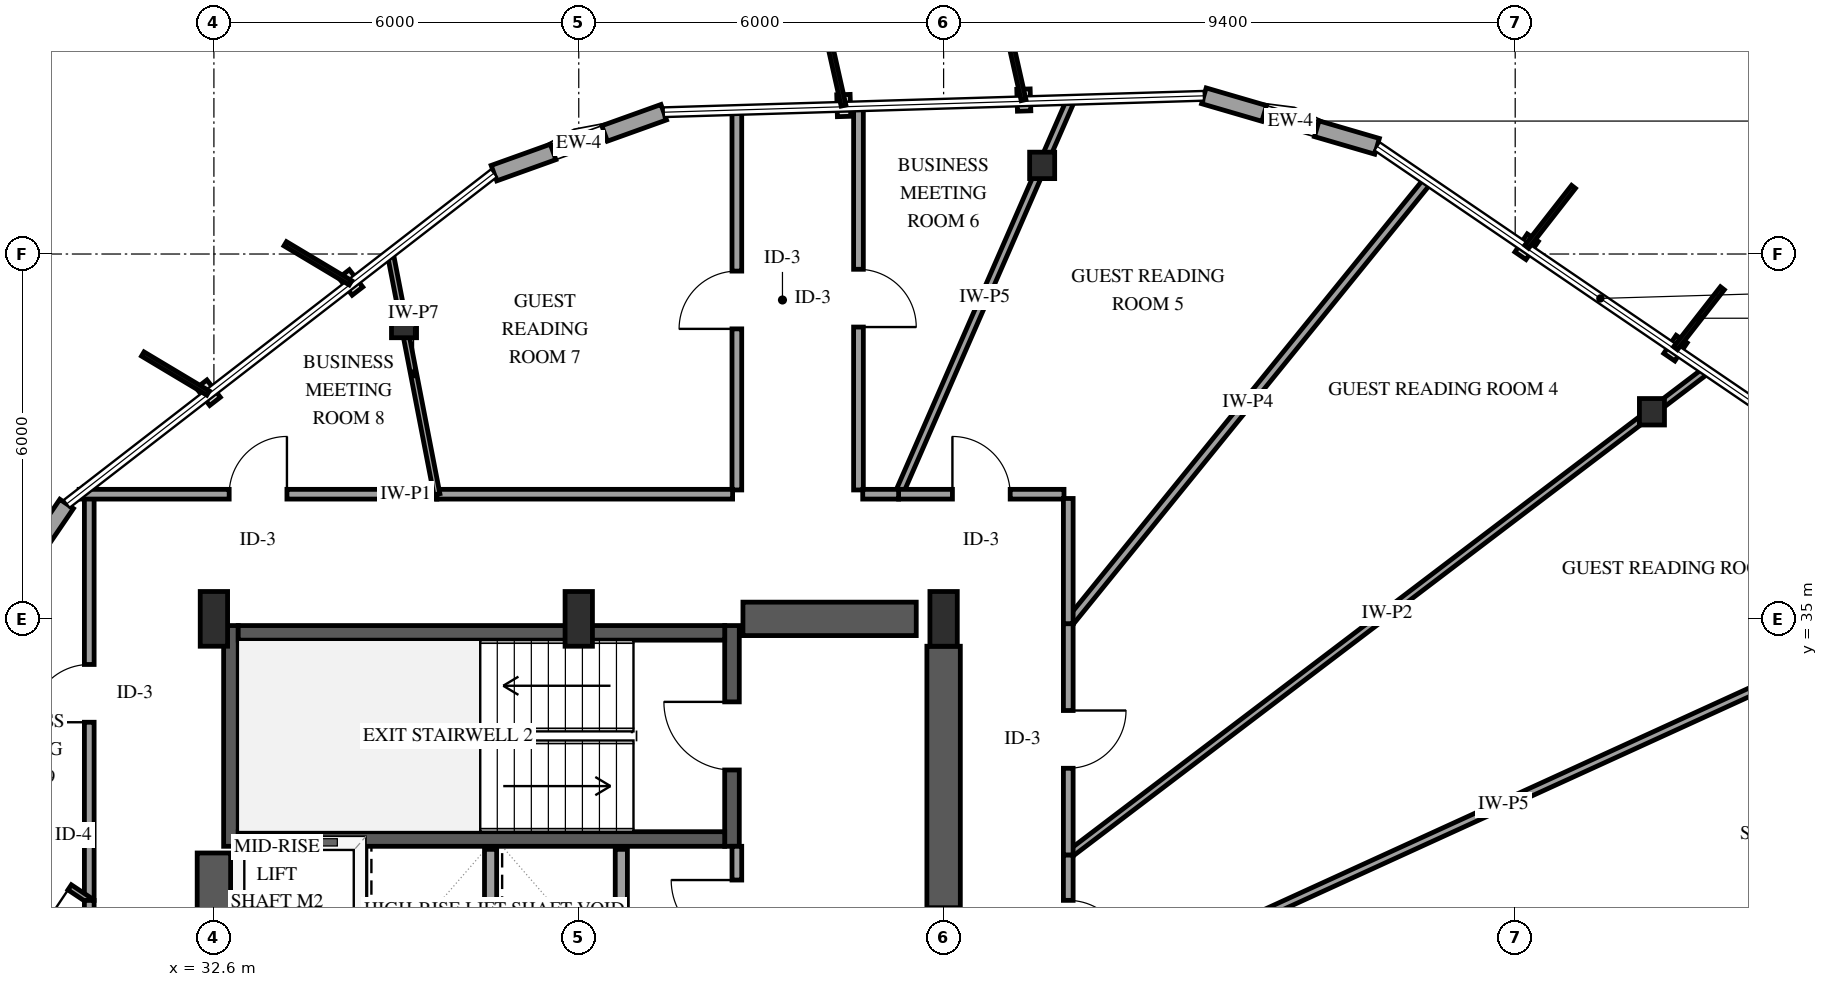
"""IFC4 building model, lengths in metres.
Left out: names, types, materials, properties, quantities, classifications, styles, units other than length and angle.
Written with IfcOpenShell. Run it as: python <this file> out.ifc"""

import sys

from ifc_helpers import new_model, si_unit, direction, frame, frame_2d, origin, origin_2d, place, context, subcontext, project, spatial, rectangle, i_section, extrude, element, fill, save


model = new_model("IFC4")
c1 = context("Model", 3, precision=1e-05, world=origin(), true_north=direction((0.0, 1.0)))
c2 = subcontext(c1, "Body", "Model", "MODEL_VIEW")
j1 = project(units=[si_unit("LENGTHUNIT", "METRE"), si_unit("PLANEANGLEUNIT", "RADIAN")], contexts=[c1])
p1 = place(None, origin())
s1 = spatial("IfcSite", under=j1, at=p1, CompositionType="ELEMENT")
p2 = place(p1, origin())
s2 = spatial("IfcBuilding", under=s1, at=p2, CompositionType="ELEMENT")
p3 = place(p2, frame((0.0, 0.0, 171.4)))
s3 = spatial("IfcBuildingStorey", under=s2, at=p3, CompositionType="ELEMENT", Elevation=171.4)
p4 = place(p3, frame((32.88, 31.26, 0.0), z_axis=(0.0, 0.0, 1.0), x_axis=(0.0, 1.0, 0.0)))
e1 = element("IfcWall", 1, at=p4, inside=s3, PredefinedType="SHEAR", context=c2, shape_type="SweptSolid", body=[
    extrude(rectangle(XDim=3.63, YDim=0.24, at=frame_2d((1.815, 0.0))), origin(), (0.0, 0.0, 1.0), 3.6),
])
p5 = place(p3, frame((41.12, 31.26, 0.0), z_axis=(0.0, 0.0, 1.0), x_axis=(0.0, 1.0, 0.0)))
e2 = element("IfcWall", 2, at=p5, inside=s3, PredefinedType="SHEAR", context=c2, shape_type="SweptSolid", body=[
    extrude(rectangle(XDim=3.63, YDim=0.24, at=frame_2d((1.815, 0.0))), origin(), (0.0, 0.0, 1.0), 3.6),
])
p6 = place(p5, frame((1.255, 0.0, 0.0)))
e3 = element("IfcOpeningElement", 3, at=p6, cuts=e2, PredefinedType="OPENING", context=c2, shape_type="SweptSolid", body=[
    extrude(rectangle(XDim=1.12, YDim=2.15, at=frame_2d((0.56, 1.075))), frame((0.0, 0.13, 0.0), z_axis=(0.0, -1.0, 0.0), x_axis=(1.0, 0.0, 0.0)), (0.0, 0.0, 1.0), 0.26),
])
for number, where, z_axis, x_axis in (
    (4, (33.0, 31.38, 0.0), (0.0, 0.0, 1.0), (1.0, 0.0, 0.0)),
    (5, (33.0, 34.77, 0.0), (0.0, 0.0, 1.0), (1.0, 0.0, 0.0)),
):
    element("IfcWall", number, at=place(p3, frame(where, z_axis=z_axis, x_axis=x_axis)), inside=s3, PredefinedType="SHEAR", context=c2, shape_type="SweptSolid", body=[
        extrude(rectangle(XDim=8.0, YDim=0.24, at=frame_2d((4.0, 0.0))), origin(), (0.0, 0.0, 1.0), 3.6),
    ])
p7 = place(p3, frame((32.6, 18.85, 0.0), z_axis=(0.0, 0.0, 1.0), x_axis=(0.0, 1.0, 0.0)))
e6 = element("IfcWall", 6, at=p7, inside=s3, PredefinedType="SHEAR", context=c2, shape_type="SweptSolid", body=[
    extrude(rectangle(XDim=12.3, YDim=0.55, at=frame_2d((6.15, 0.0))), origin(), (0.0, 0.0, 1.0), 3.6),
])
p8 = place(p3, frame((41.3, 35.0, 0.0), z_axis=(0.0, 0.0, 1.0), x_axis=(1.0, 0.0, 0.0)))
e7 = element("IfcWall", 7, at=p8, inside=s3, PredefinedType="SHEAR", context=c2, shape_type="SweptSolid", body=[
    extrude(rectangle(XDim=2.85, YDim=0.55, at=frame_2d((1.425, 0.0))), origin(), (0.0, 0.0, 1.0), 3.6),
])
p9 = place(p3, frame((44.6, 29.8, 0.0), z_axis=(0.0, 0.0, 1.0), x_axis=(0.0, 1.0, 0.0)))
e8 = element("IfcWall", 8, at=p9, inside=s3, PredefinedType="SHEAR", context=c2, shape_type="SweptSolid", body=[
    extrude(rectangle(XDim=4.75, YDim=0.55, at=frame_2d((2.375, 0.0))), origin(), (0.0, 0.0, 1.0), 3.6),
])
for number, where, z_axis, x_axis in (
    (9, (32.6, 35.0, 0.0), (0.0, 0.0, 1.0), (1.0, 0.0, 0.0)),
    (10, (38.6, 35.0, 0.0), (0.0, 0.0, 1.0), (1.0, 0.0, 0.0)),
    (11, (44.6, 35.0, 0.0), (0.0, 0.0, 1.0), (1.0, 0.0, 0.0)),
):
    element("IfcColumn", number, at=place(p3, frame(where, z_axis=z_axis, x_axis=x_axis)), inside=s3, PredefinedType="PILASTER", context=c2, shape_type="SweptSolid", body=[
        extrude(rectangle(XDim=0.45, YDim=0.9, at=origin_2d()), origin(), (0.0, 0.0, 1.0), 3.6),
    ])
for number, where, z_axis, x_axis in (
    (12, (56.249, 38.406, 0.0), (0.0, 0.0, 1.0), (1.0, 0.0, 0.0)),
    (13, (46.221, 42.458, 0.0), (0.0, 0.0, 1.0), (1.0, 0.0, 0.0)),
    (14, (35.726, 39.841, 0.0), (0.0, 0.0, 1.0), (1.0, 0.0, 0.0)),
):
    element("IfcColumn", number, at=place(p3, frame(where, z_axis=z_axis, x_axis=x_axis)), inside=s3, PredefinedType="COLUMN", context=c2, shape_type="SweptSolid", body=[
        extrude(i_section(OverallWidth=0.412, OverallDepth=0.435, WebThickness=0.036, FlangeThickness=0.057, FilletRadius=0.038, at=origin_2d()), origin(), (0.0, 0.0, 1.0), 3.6),
    ])
p10 = place(p3, frame((51.728, 42.771, 0.0), z_axis=(0.0, 0.0, 1.0), x_axis=(-0.96000645191, 0.279977878217, 0.0)))
e15 = element("IfcWall", 15, at=p10, inside=s3, PredefinedType="SOLIDWALL", context=c2, shape_type="SweptSolid", body=[
    extrude(rectangle(XDim=2.967, YDim=0.27, at=frame_2d((1.483, 0.0))), origin(), (0.0, 0.0, 1.0), 2.679),
])
p11 = place(p10, frame((1.033, 0.0, 0.75)))
e16 = element("IfcOpeningElement", 16, at=p11, cuts=e15, PredefinedType="OPENING", context=c2, shape_type="SweptSolid", body=[
    extrude(rectangle(XDim=0.9, YDim=1.5, at=frame_2d((0.45, 0.75))), frame((0.0, 0.145, 0.0), z_axis=(0.0, -1.0, 0.0), x_axis=(1.0, 0.0, 0.0)), (0.0, 0.0, 1.0), 0.29),
])
p12 = place(p3, frame((39.998, 43.332, 0.0), z_axis=(0.0, 0.0, 1.0), x_axis=(-0.94123626771, -0.337748853955, 0.0)))
e17 = element("IfcWall", 17, at=p12, inside=s3, PredefinedType="SOLIDWALL", context=c2, shape_type="SweptSolid", body=[
    extrude(rectangle(XDim=2.967, YDim=0.27, at=frame_2d((1.483, 0.0))), origin(), (0.0, 0.0, 1.0), 2.679),
])
p13 = place(p12, frame((1.033, 0.0, 0.75)))
e18 = element("IfcOpeningElement", 18, at=p13, cuts=e17, PredefinedType="OPENING", context=c2, shape_type="SweptSolid", body=[
    extrude(rectangle(XDim=0.9, YDim=1.5, at=frame_2d((0.45, 0.75))), frame((0.0, 0.145, 0.0), z_axis=(0.0, -1.0, 0.0), x_axis=(1.0, 0.0, 0.0)), (0.0, 0.0, 1.0), 0.29),
])
p14 = place(p3, frame((30.178, 36.89, 0.0), z_axis=(0.0, 0.0, 1.0), x_axis=(-0.563009904687, -0.826450148058, 0.0)))
e19 = element("IfcWall", 19, at=p14, inside=s3, PredefinedType="SOLIDWALL", context=c2, shape_type="SweptSolid", body=[
    extrude(rectangle(XDim=2.967, YDim=0.27, at=frame_2d((1.483, 0.0))), origin(), (0.0, 0.0, 1.0), 2.679),
])
p15 = place(p14, frame((1.033, 0.0, 0.75)))
e20 = element("IfcOpeningElement", 20, at=p15, cuts=e19, PredefinedType="OPENING", context=c2, shape_type="SweptSolid", body=[
    extrude(rectangle(XDim=0.9, YDim=1.5, at=frame_2d((0.45, 0.75))), frame((0.0, 0.145, 0.0), z_axis=(0.0, -1.0, 0.0), x_axis=(1.0, 0.0, 0.0)), (0.0, 0.0, 1.0), 0.29),
])
for number, where, z_axis, x_axis in (
    (21, (35.0, 29.11, 0.0), (0.0, 0.0, 1.0), (0.0, 1.0, 0.0)),
    (22, (37.15, 29.11, 0.0), (0.0, 0.0, 1.0), (0.0, 1.0, 0.0)),
    (23, (39.3, 29.11, 0.0), (0.0, 0.0, 1.0), (0.0, 1.0, 0.0)),
):
    element("IfcWall", number, at=place(p3, frame(where, z_axis=z_axis, x_axis=x_axis)), inside=s3, PredefinedType="SOLIDWALL", context=c2, shape_type="SweptSolid", body=[
        extrude(rectangle(XDim=2.1, YDim=0.2, at=frame_2d((1.05, 0.0))), origin(), (0.0, 0.0, 1.0), 3.3),
    ])
p16 = place(p3, frame((46.65, 28.677, 0.0), z_axis=(0.0, 0.0, 1.0), x_axis=(0.909594452682, 0.41549721016, 0.0)))
e24 = element("IfcWall", 24, at=p16, inside=s3, PredefinedType="PARTITIONING", context=c2, shape_type="SweptSolid", body=[
    extrude(rectangle(XDim=15.736, YDim=0.13, at=frame_2d((7.868, 0.0))), origin(), (0.0, 0.0, 1.0), 3.3),
])
p17 = place(p3, frame((46.65, 31.115, 0.0), z_axis=(0.0, 0.0, 1.0), x_axis=(0.79632035824, 0.604875100375, 0.0)))
e25 = element("IfcWall", 25, at=p17, inside=s3, PredefinedType="PARTITIONING", context=c2, shape_type="SweptSolid", body=[
    extrude(rectangle(XDim=13.175, YDim=0.12, at=frame_2d((6.587, 0.0))), origin(), (0.0, 0.0, 1.0), 3.3),
])
p18 = place(p3, frame((46.65, 34.921, 0.0), z_axis=(0.0, 0.0, 1.0), x_axis=(0.63011430349, 0.776502391842, 0.0)))
e26 = element("IfcWall", 26, at=p18, inside=s3, PredefinedType="PARTITIONING", context=c2, shape_type="SweptSolid", body=[
    extrude(rectangle(XDim=9.379, YDim=0.14, at=frame_2d((4.69, 0.0))), origin(), (0.0, 0.0, 1.0), 3.3),
])
p19 = place(p3, frame((43.86, 37.05, 0.0), z_axis=(0.0, 0.0, 1.0), x_axis=(0.400185264295, 0.916434260731, 0.0)))
e27 = element("IfcWall", 27, at=p19, inside=s3, PredefinedType="PARTITIONING", context=c2, shape_type="SweptSolid", body=[
    extrude(rectangle(XDim=7.076, YDim=0.13, at=frame_2d((3.538, 0.0))), origin(), (0.0, 0.0, 1.0), 2.595),
])
p20 = place(p3, frame((30.55, 30.37, 0.0), z_axis=(0.0, 0.0, 1.0), x_axis=(0.0, 1.0, 0.0)))
e28 = element("IfcWall", 28, at=p20, inside=s3, PredefinedType="PARTITIONING", context=c2, shape_type="SweptSolid", body=[
    extrude(rectangle(XDim=6.809, YDim=0.16, at=frame_2d((3.404, 0.0))), origin(), (0.0, 0.0, 1.0), 3.3),
])
p21 = place(p20, frame((2.93, 0.0, 0.0)))
e29 = element("IfcOpeningElement", 29, at=p21, cuts=e28, PredefinedType="OPENING", context=c2, shape_type="SweptSolid", body=[
    extrude(rectangle(XDim=0.95, YDim=2.15, at=frame_2d((0.475, 1.075))), frame((0.0, 0.09, 0.0), z_axis=(0.0, -1.0, 0.0), x_axis=(1.0, 0.0, 0.0)), (0.0, 0.0, 1.0), 0.18),
])
p22 = place(p3, frame((43.2, 43.429, 0.0), z_axis=(0.0, 0.0, 1.0), x_axis=(0.0, -1.0, 0.0)))
e30 = element("IfcWall", 30, at=p22, inside=s3, PredefinedType="PARTITIONING", context=c2, shape_type="SweptSolid", body=[
    extrude(rectangle(XDim=6.309, YDim=0.16, at=frame_2d((3.154, 0.0))), origin(), (0.0, 0.0, 1.0), 3.3),
])
p23 = place(p22, frame((2.68, 0.0, 0.0)))
e31 = element("IfcOpeningElement", 31, at=p23, cuts=e30, PredefinedType="OPENING", context=c2, shape_type="SweptSolid", body=[
    extrude(rectangle(XDim=0.95, YDim=2.15, at=frame_2d((0.475, 1.075))), frame((0.0, 0.09, 0.0), z_axis=(0.0, -1.0, 0.0), x_axis=(1.0, 0.0, 0.0)), (0.0, 0.0, 1.0), 0.18),
])
p24 = place(p3, frame((41.2, 37.12, 0.0), z_axis=(0.0, 0.0, 1.0), x_axis=(0.0, 1.0, 0.0)))
e32 = element("IfcWall", 32, at=p24, inside=s3, PredefinedType="PARTITIONING", context=c2, shape_type="SweptSolid", body=[
    extrude(rectangle(XDim=6.248, YDim=0.16, at=frame_2d((3.124, 0.0))), origin(), (0.0, 0.0, 1.0), 2.678),
])
p25 = place(p24, frame((2.649, 0.0, 0.0)))
e33 = element("IfcOpeningElement", 33, at=p25, cuts=e32, PredefinedType="OPENING", context=c2, shape_type="SweptSolid", body=[
    extrude(rectangle(XDim=0.95, YDim=2.15, at=frame_2d((0.475, 1.075))), frame((0.0, 0.09, 0.0), z_axis=(0.0, -1.0, 0.0), x_axis=(1.0, 0.0, 0.0)), (0.0, 0.0, 1.0), 0.18),
])
p26 = place(p3, frame((30.384, 37.05, 0.0), z_axis=(0.0, 0.0, 1.0), x_axis=(1.0, 0.0, 0.0)))
e34 = element("IfcWall", 34, at=p26, inside=s3, PredefinedType="PARTITIONING", context=c2, shape_type="SweptSolid", body=[
    extrude(rectangle(XDim=5.883, YDim=0.16, at=frame_2d((2.941, 0.0))), origin(), (0.0, 0.0, 1.0), 3.3),
])
p27 = place(p26, frame((2.467, 0.0, 0.0)))
e35 = element("IfcOpeningElement", 35, at=p27, cuts=e34, PredefinedType="OPENING", context=c2, shape_type="SweptSolid", body=[
    extrude(rectangle(XDim=0.95, YDim=2.15, at=frame_2d((0.475, 1.075))), frame((0.0, 0.09, 0.0), z_axis=(0.0, -1.0, 0.0), x_axis=(1.0, 0.0, 0.0)), (0.0, 0.0, 1.0), 0.18),
])
p28 = place(p3, frame((36.267, 37.05, 0.0), z_axis=(0.0, 0.0, 1.0), x_axis=(1.0, 0.0, 0.0)))
e36 = element("IfcWall", 36, at=p28, inside=s3, PredefinedType="PARTITIONING", context=c2, shape_type="SweptSolid", body=[
    extrude(rectangle(XDim=4.863, YDim=0.16, at=frame_2d((2.431, 0.0))), origin(), (0.0, 0.0, 1.0), 3.3),
])
p29 = place(p3, frame((36.267, 37.05, 0.0), z_axis=(0.0, 0.0, 1.0), x_axis=(-0.190176227139, 0.981749969509, 0.0)))
e37 = element("IfcWall", 37, at=p29, inside=s3, PredefinedType="PARTITIONING", context=c2, shape_type="SweptSolid", body=[
    extrude(rectangle(XDim=4.034, YDim=0.1, at=frame_2d((2.017, 0.0))), origin(), (0.0, 0.0, 1.0), 2.595),
])
p30 = place(p3, frame((46.65, 34.921, 0.0), z_axis=(0.0, 0.0, 1.0), x_axis=(0.0, -1.0, 0.0)))
e38 = element("IfcWall", 38, at=p30, inside=s3, PredefinedType="PARTITIONING", context=c2, shape_type="SweptSolid", body=[
    extrude(rectangle(XDim=3.806, YDim=0.16, at=frame_2d((1.903, 0.0))), origin(), (0.0, 0.0, 1.0), 3.3),
])
p31 = place(p30, frame((1.428, 0.0, 0.0)))
e39 = element("IfcOpeningElement", 39, at=p31, cuts=e38, PredefinedType="OPENING", context=c2, shape_type="SweptSolid", body=[
    extrude(rectangle(XDim=0.95, YDim=2.15, at=frame_2d((0.475, 1.075))), frame((0.0, 0.09, 0.0), z_axis=(0.0, -1.0, 0.0), x_axis=(1.0, 0.0, 0.0)), (0.0, 0.0, 1.0), 0.18),
])
p32 = place(p3, frame((30.55, 30.37, 0.0), z_axis=(0.0, 0.0, 1.0), x_axis=(-0.831784371752, 0.555098873092, 0.0)))
e40 = element("IfcWall", 40, at=p32, inside=s3, PredefinedType="PARTITIONING", context=c2, shape_type="SweptSolid", body=[
    extrude(rectangle(XDim=3.25, YDim=0.1, at=frame_2d((1.625, 0.0))), origin(), (0.0, 0.0, 1.0), 3.3),
])
p33 = place(p32, frame((0.387, 0.0, 0.0)))
e41 = element("IfcOpeningElement", 41, at=p33, cuts=e40, PredefinedType="OPENING", context=c2, shape_type="SweptSolid", body=[
    extrude(rectangle(XDim=0.85, YDim=2.1, at=frame_2d((0.425, 1.05))), frame((0.0, 0.06, 0.0), z_axis=(0.0, -1.0, 0.0), x_axis=(1.0, 0.0, 0.0)), (0.0, 0.0, 1.0), 0.12),
])
p34 = place(p3, frame((43.86, 37.05, 0.0), z_axis=(0.0, 0.0, 1.0), x_axis=(1.0, 0.0, 0.0)))
e42 = element("IfcWall", 42, at=p34, inside=s3, PredefinedType="PARTITIONING", context=c2, shape_type="SweptSolid", body=[
    extrude(rectangle(XDim=2.72, YDim=0.16, at=frame_2d((1.36, 0.0))), origin(), (0.0, 0.0, 1.0), 3.3),
])
p35 = place(p34, frame((0.885, 0.0, 0.0)))
e43 = element("IfcOpeningElement", 43, at=p35, cuts=e42, PredefinedType="OPENING", context=c2, shape_type="SweptSolid", body=[
    extrude(rectangle(XDim=0.95, YDim=2.15, at=frame_2d((0.475, 1.075))), frame((0.0, 0.09, 0.0), z_axis=(0.0, -1.0, 0.0), x_axis=(1.0, 0.0, 0.0)), (0.0, 0.0, 1.0), 0.18),
])
p36 = place(p3, frame((46.65, 31.115, 0.0), z_axis=(0.0, 0.0, 1.0), x_axis=(0.0, -1.0, 0.0)))
e44 = element("IfcWall", 44, at=p36, inside=s3, PredefinedType="PARTITIONING", context=c2, shape_type="SweptSolid", body=[
    extrude(rectangle(XDim=2.438, YDim=0.16, at=frame_2d((1.219, 0.0))), origin(), (0.0, 0.0, 1.0), 3.3),
])
p37 = place(p36, frame((0.744, 0.0, 0.0)))
e45 = element("IfcOpeningElement", 45, at=p37, cuts=e44, PredefinedType="OPENING", context=c2, shape_type="SweptSolid", body=[
    extrude(rectangle(XDim=0.95, YDim=2.15, at=frame_2d((0.475, 1.075))), frame((0.0, 0.09, 0.0), z_axis=(0.0, -1.0, 0.0), x_axis=(1.0, 0.0, 0.0)), (0.0, 0.0, 1.0), 0.18),
])
p38 = place(p3, frame((41.2, 29.07, 0.0), z_axis=(0.0, 0.0, 1.0), x_axis=(0.0, 1.0, 0.0)))
e46 = element("IfcWall", 46, at=p38, inside=s3, PredefinedType="PARTITIONING", context=c2, shape_type="SweptSolid", body=[
    extrude(rectangle(XDim=2.19, YDim=0.16, at=frame_2d((1.095, 0.0))), origin(), (0.0, 0.0, 1.0), 3.3),
])
p39 = place(p38, frame((0.555, 0.0, 0.0)))
e47 = element("IfcOpeningElement", 47, at=p39, cuts=e46, PredefinedType="OPENING", context=c2, shape_type="SweptSolid", body=[
    extrude(rectangle(XDim=1.08, YDim=2.15, at=frame_2d((0.54, 1.075))), frame((0.0, 0.09, 0.0), z_axis=(0.0, -1.0, 0.0), x_axis=(1.0, 0.0, 0.0)), (0.0, 0.0, 1.0), 0.18),
])
p40 = place(p3, frame((46.65, 36.98, 0.0), z_axis=(0.0, 0.0, 1.0), x_axis=(0.0, -1.0, 0.0)))
e48 = element("IfcWall", 48, at=p40, inside=s3, PredefinedType="PARTITIONING", context=c2, shape_type="SweptSolid", body=[
    extrude(rectangle(XDim=2.059, YDim=0.16, at=frame_2d((1.03, 0.0))), origin(), (0.0, 0.0, 1.0), 3.3),
])
p41 = place(p3, frame((43.27, 37.05, 0.0), z_axis=(0.0, 0.0, 1.0), x_axis=(1.0, 0.0, 0.0)))
e49 = element("IfcWall", 49, at=p41, inside=s3, PredefinedType="PARTITIONING", context=c2, shape_type="SweptSolid", body=[
    extrude(rectangle(XDim=0.59, YDim=0.16, at=frame_2d((0.295, 0.0))), origin(), (0.0, 0.0, 1.0), 3.3),
])
p42 = place(p3, frame((30.55, 21.826, 0.0), z_axis=(0.0, 0.0, 1.0), x_axis=(0.0, 1.0, 0.0)))
e50 = element("IfcWall", 50, at=p42, inside=s3, PredefinedType="PARTITIONING", context=c2, shape_type="SweptSolid", body=[
    extrude(rectangle(XDim=8.544, YDim=0.16, at=frame_2d((4.272, 0.0))), origin(), (0.0, 0.0, 1.0), 3.3),
])
p43 = place(p11, origin())
e51 = element("IfcWindow", 51, at=p43, inside=s3, PartitioningType="SINGLE_PANEL", PredefinedType="WINDOW", context=c2, shape_type="SweptSolid", body=[
    extrude(rectangle(XDim=0.9, YDim=1.5, at=frame_2d((0.45, 0.75))), frame((0.0, 0.03, 0.0), z_axis=(0.0, -1.0, 0.0), x_axis=(1.0, 0.0, 0.0)), (0.0, 0.0, 1.0), 0.06),
])
fill(e16, e51)
p44 = place(p13, origin())
e52 = element("IfcWindow", 52, at=p44, inside=s3, PartitioningType="SINGLE_PANEL", PredefinedType="WINDOW", context=c2, shape_type="SweptSolid", body=[
    extrude(rectangle(XDim=0.9, YDim=1.5, at=frame_2d((0.45, 0.75))), frame((0.0, 0.03, 0.0), z_axis=(0.0, -1.0, 0.0), x_axis=(1.0, 0.0, 0.0)), (0.0, 0.0, 1.0), 0.06),
])
fill(e18, e52)
p45 = place(p6, origin())
e53 = element("IfcDoor", 53, at=p45, inside=s3, OperationType="SINGLE_SWING_RIGHT", PredefinedType="DOOR", context=c2, shape_type="SweptSolid", body=[
    extrude(rectangle(XDim=1.12, YDim=2.15, at=frame_2d((0.56, 1.075))), frame((0.0, 0.025, 0.0), z_axis=(0.0, -1.0, 0.0), x_axis=(1.0, 0.0, 0.0)), (0.0, 0.0, 1.0), 0.05),
])
fill(e3, e53)
p46 = place(p21, origin())
e54 = element("IfcDoor", 54, at=p46, inside=s3, OperationType="SINGLE_SWING_LEFT", PredefinedType="DOOR", context=c2, shape_type="SweptSolid", body=[
    extrude(rectangle(XDim=0.95, YDim=2.15, at=frame_2d((0.475, 1.075))), frame((0.0, 0.025, 0.0), z_axis=(0.0, -1.0, 0.0), x_axis=(1.0, 0.0, 0.0)), (0.0, 0.0, 1.0), 0.05),
])
fill(e29, e54)
p47 = place(p23, origin())
e55 = element("IfcDoor", 55, at=p47, inside=s3, OperationType="SINGLE_SWING_RIGHT", PredefinedType="DOOR", context=c2, shape_type="SweptSolid", body=[
    extrude(rectangle(XDim=0.95, YDim=2.15, at=frame_2d((0.475, 1.075))), frame((0.0, 0.025, 0.0), z_axis=(0.0, -1.0, 0.0), x_axis=(1.0, 0.0, 0.0)), (0.0, 0.0, 1.0), 0.05),
])
fill(e31, e55)
p48 = place(p25, origin())
e56 = element("IfcDoor", 56, at=p48, inside=s3, OperationType="SINGLE_SWING_LEFT", PredefinedType="DOOR", context=c2, shape_type="SweptSolid", body=[
    extrude(rectangle(XDim=0.95, YDim=2.15, at=frame_2d((0.475, 1.075))), frame((0.0, 0.025, 0.0), z_axis=(0.0, -1.0, 0.0), x_axis=(1.0, 0.0, 0.0)), (0.0, 0.0, 1.0), 0.05),
])
fill(e33, e56)
p49 = place(p27, origin())
e57 = element("IfcDoor", 57, at=p49, inside=s3, OperationType="SINGLE_SWING_RIGHT", PredefinedType="DOOR", context=c2, shape_type="SweptSolid", body=[
    extrude(rectangle(XDim=0.95, YDim=2.15, at=frame_2d((0.475, 1.075))), frame((0.0, 0.025, 0.0), z_axis=(0.0, -1.0, 0.0), x_axis=(1.0, 0.0, 0.0)), (0.0, 0.0, 1.0), 0.05),
])
fill(e35, e57)
p50 = place(p31, origin())
e58 = element("IfcDoor", 58, at=p50, inside=s3, OperationType="SINGLE_SWING_LEFT", PredefinedType="DOOR", context=c2, shape_type="SweptSolid", body=[
    extrude(rectangle(XDim=0.95, YDim=2.15, at=frame_2d((0.475, 1.075))), frame((0.0, 0.025, 0.0), z_axis=(0.0, -1.0, 0.0), x_axis=(1.0, 0.0, 0.0)), (0.0, 0.0, 1.0), 0.05),
])
fill(e39, e58)
p51 = place(p33, origin())
e59 = element("IfcDoor", 59, at=p51, inside=s3, OperationType="SINGLE_SWING_LEFT", PredefinedType="DOOR", context=c2, shape_type="SweptSolid", body=[
    extrude(rectangle(XDim=0.85, YDim=2.1, at=frame_2d((0.425, 1.05))), frame((0.0, 0.025, 0.0), z_axis=(0.0, -1.0, 0.0), x_axis=(1.0, 0.0, 0.0)), (0.0, 0.0, 1.0), 0.05),
])
fill(e41, e59)
p52 = place(p35, origin())
e60 = element("IfcDoor", 60, at=p52, inside=s3, OperationType="SINGLE_SWING_LEFT", PredefinedType="DOOR", context=c2, shape_type="SweptSolid", body=[
    extrude(rectangle(XDim=0.95, YDim=2.15, at=frame_2d((0.475, 1.075))), frame((0.0, 0.025, 0.0), z_axis=(0.0, -1.0, 0.0), x_axis=(1.0, 0.0, 0.0)), (0.0, 0.0, 1.0), 0.05),
])
fill(e43, e60)
p53 = place(p37, origin())
e61 = element("IfcDoor", 61, at=p53, inside=s3, OperationType="SINGLE_SWING_RIGHT", PredefinedType="DOOR", context=c2, shape_type="SweptSolid", body=[
    extrude(rectangle(XDim=0.95, YDim=2.15, at=frame_2d((0.475, 1.075))), frame((0.0, 0.025, 0.0), z_axis=(0.0, -1.0, 0.0), x_axis=(1.0, 0.0, 0.0)), (0.0, 0.0, 1.0), 0.05),
])
fill(e45, e61)
p54 = place(p39, origin())
e62 = element("IfcDoor", 62, at=p54, inside=s3, OperationType="SINGLE_SWING_RIGHT", PredefinedType="DOOR", context=c2, shape_type="SweptSolid", body=[
    extrude(rectangle(XDim=1.08, YDim=2.15, at=frame_2d((0.54, 1.075))), frame((0.0, 0.025, 0.0), z_axis=(0.0, -1.0, 0.0), x_axis=(1.0, 0.0, 0.0)), (0.0, 0.0, 1.0), 0.05),
])
fill(e47, e62)
save(model, sys.argv[1])
